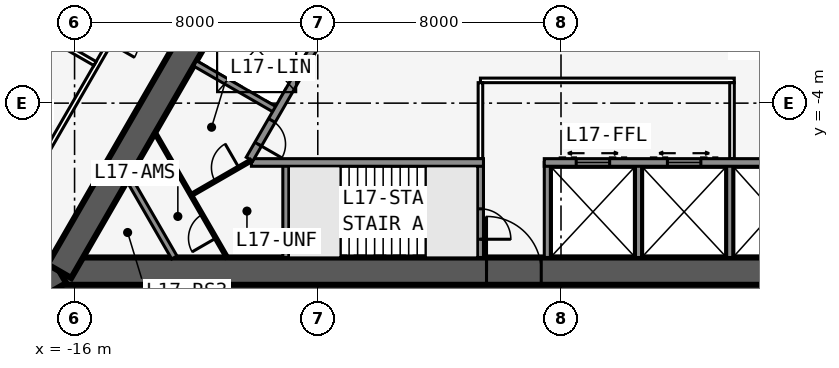
"""IFC4 building model, lengths in metres.
Left out: names, types, materials, properties, quantities, classifications, styles, units other than length and angle.
Written with IfcOpenShell. Run it as: python <this file> out.ifc"""

import sys

from ifc_helpers import new_model, si_unit, direction, frame, frame_2d, origin, place, context, subcontext, project, spatial, rectangle, extrude, element, fill, save


model = new_model("IFC4")
c1 = context("Model", 3, precision=1e-05, world=origin(), true_north=direction((0.0, 1.0)))
c2 = subcontext(c1, "Body", "Model", "MODEL_VIEW")
j1 = project(units=[si_unit("LENGTHUNIT", "METRE"), si_unit("PLANEANGLEUNIT", "RADIAN")], contexts=[c1])
p1 = place(None, origin())
s1 = spatial("IfcSite", under=j1, at=p1, CompositionType="ELEMENT")
p2 = place(p1, origin())
s2 = spatial("IfcBuilding", under=s1, at=p2, CompositionType="ELEMENT")
p3 = place(p2, frame((0.0, 0.0, 69.3)))
s3 = spatial("IfcBuildingStorey", under=s2, at=p3, CompositionType="ELEMENT", Elevation=69.3)
p4 = place(p3, frame((-16.5, -9.526, 0.0), z_axis=(0.0, 0.0, 1.0), x_axis=(1.0, 0.0, 0.0)))
e1 = element("IfcWall", 1, at=p4, inside=s3, PredefinedType="SHEAR", context=c2, shape_type="SweptSolid", body=[
    extrude(rectangle(XDim=33.0, YDim=0.9, at=frame_2d((16.5, 0.0))), origin(), (0.0, 0.0, 1.0), 3.4),
])
p5 = place(p4, frame((14.05, 0.0, 0.0)))
e2 = element("IfcOpeningElement", 2, at=p5, cuts=e1, PredefinedType="OPENING", context=c2, shape_type="SweptSolid", body=[
    extrude(rectangle(XDim=1.8, YDim=2.13, at=frame_2d((0.9, 1.065))), frame((0.0, 0.46, 0.0), z_axis=(0.0, -1.0, 0.0), x_axis=(1.0, 0.0, 0.0)), (0.0, 0.0, 1.0), 0.92),
])
p6 = place(p3, frame((-10.183, -5.951, 0.0), z_axis=(0.0, 0.0, 1.0), x_axis=(1.0, 0.0, 0.0)))
e3 = element("IfcWall", 3, at=p6, inside=s3, PredefinedType="SOLIDWALL", context=c2, shape_type="SweptSolid", body=[
    extrude(rectangle(XDim=7.633, YDim=0.25, at=frame_2d((3.816, 0.0))), origin(), (0.0, 0.0, 1.0), 3.235),
])
p7 = place(p3, frame((-0.55, -5.951, 0.0), z_axis=(0.0, 0.0, 1.0), x_axis=(1.0, 0.0, 0.0)))
e4 = element("IfcWall", 4, at=p7, inside=s3, PredefinedType="SOLIDWALL", context=c2, shape_type="SweptSolid", body=[
    extrude(rectangle(XDim=10.733, YDim=0.25, at=frame_2d((5.366, 0.0))), origin(), (0.0, 0.0, 1.0), 3.235),
])
p8 = place(p7, frame((9.314, 0.0, 0.0)))
e5 = element("IfcOpeningElement", 5, at=p8, cuts=e4, PredefinedType="OPENING", context=c2, shape_type="SweptSolid", body=[
    extrude(rectangle(XDim=0.9, YDim=2.13, at=frame_2d((0.45, 1.065))), frame((0.0, 0.135, 0.0), z_axis=(0.0, -1.0, 0.0), x_axis=(1.0, 0.0, 0.0)), (0.0, 0.0, 1.0), 0.27),
])
p9 = place(p7, frame((1.05, 0.0, 0.0)))
e6 = element("IfcOpeningElement", 6, at=p9, cuts=e4, PredefinedType="OPENING", context=c2, shape_type="SweptSolid", body=[
    extrude(rectangle(XDim=1.1, YDim=2.13, at=frame_2d((0.55, 1.065))), frame((0.0, 0.135, 0.0), z_axis=(0.0, -1.0, 0.0), x_axis=(1.0, 0.0, 0.0)), (0.0, 0.0, 1.0), 0.27),
])
p10 = place(p7, frame((4.05, 0.0, 0.0)))
e7 = element("IfcOpeningElement", 7, at=p10, cuts=e4, PredefinedType="OPENING", context=c2, shape_type="SweptSolid", body=[
    extrude(rectangle(XDim=1.1, YDim=2.13, at=frame_2d((0.55, 1.065))), frame((0.0, 0.135, 0.0), z_axis=(0.0, -1.0, 0.0), x_axis=(1.0, 0.0, 0.0)), (0.0, 0.0, 1.0), 0.27),
])
p11 = place(p3, frame((-9.05, -5.951, 0.0), z_axis=(0.0, 0.0, 1.0), x_axis=(0.0, -1.0, 0.0)))
e8 = element("IfcWall", 8, at=p11, inside=s3, PredefinedType="SOLIDWALL", context=c2, shape_type="SweptSolid", body=[
    extrude(rectangle(XDim=3.125, YDim=0.2, at=frame_2d((1.562, 0.0))), origin(), (0.0, 0.0, 1.0), 3.235),
])
p12 = place(p3, frame((-2.65, -5.951, 0.0), z_axis=(0.0, 0.0, 1.0), x_axis=(0.0, -1.0, 0.0)))
e9 = element("IfcWall", 9, at=p12, inside=s3, PredefinedType="SOLIDWALL", context=c2, shape_type="SweptSolid", body=[
    extrude(rectangle(XDim=3.125, YDim=0.2, at=frame_2d((1.562, 0.0))), origin(), (0.0, 0.0, 1.0), 3.235),
])
p13 = place(p12, frame((1.525, 0.0, 0.0)))
e10 = element("IfcOpeningElement", 10, at=p13, cuts=e9, PredefinedType="OPENING", context=c2, shape_type="SweptSolid", body=[
    extrude(rectangle(XDim=1.0, YDim=2.13, at=frame_2d((0.5, 1.065))), frame((0.0, 0.11, 0.0), z_axis=(0.0, -1.0, 0.0), x_axis=(1.0, 0.0, 0.0)), (0.0, 0.0, 1.0), 0.22),
])
for number, where, z_axis, x_axis in (
    (11, (-0.45, -5.951, 0.0), (0.0, 0.0, 1.0), (0.0, -1.0, 0.0)),
    (12, (2.55, -5.951, 0.0), (0.0, 0.0, 1.0), (0.0, -1.0, 0.0)),
    (13, (5.55, -5.951, 0.0), (0.0, 0.0, 1.0), (0.0, -1.0, 0.0)),
):
    element("IfcWall", number, at=place(p3, frame(where, z_axis=z_axis, x_axis=x_axis)), inside=s3, PredefinedType="SOLIDWALL", context=c2, shape_type="SweptSolid", body=[
        extrude(rectangle(XDim=3.125, YDim=0.2, at=frame_2d((1.562, 0.0))), origin(), (0.0, 0.0, 1.0), 3.235),
    ])
p14 = place(p3, frame((16.5, -9.526, 0.0), z_axis=(0.0, 0.0, 1.0), x_axis=(-0.499999749417, 0.866025548458, 0.0)))
e14 = element("IfcWall", 14, at=p14, inside=s3, PredefinedType="SHEAR", context=c2, shape_type="SweptSolid", body=[
    extrude(rectangle(XDim=33.0, YDim=0.9, at=frame_2d((16.5, 0.0))), origin(), (0.0, 0.0, 1.0), 3.4),
])
p15 = place(p14, frame((14.15, 0.0, 0.0)))
e15 = element("IfcOpeningElement", 15, at=p15, cuts=e14, PredefinedType="OPENING", context=c2, shape_type="SweptSolid", body=[
    extrude(rectangle(XDim=1.8, YDim=2.13, at=frame_2d((0.9, 1.065))), frame((0.0, 0.46, 0.0), z_axis=(0.0, -1.0, 0.0), x_axis=(1.0, 0.0, 0.0)), (0.0, 0.0, 1.0), 0.92),
])
p16 = place(p14, frame((12.6, 0.0, 0.0)))
e16 = element("IfcOpeningElement", 16, at=p16, cuts=e14, PredefinedType="OPENING", context=c2, shape_type="SweptSolid", body=[
    extrude(rectangle(XDim=1.0, YDim=2.13, at=frame_2d((0.5, 1.065))), frame((0.0, 0.46, 0.0), z_axis=(0.0, -1.0, 0.0), x_axis=(1.0, 0.0, 0.0)), (0.0, 0.0, 1.0), 0.92),
])
p17 = place(p3, frame((10.245, -5.843, 0.0), z_axis=(0.0, 0.0, 1.0), x_axis=(-0.499993009313, 0.866029439822, 0.0)))
e17 = element("IfcWall", 17, at=p17, inside=s3, PredefinedType="SOLIDWALL", context=c2, shape_type="SweptSolid", body=[
    extrude(rectangle(XDim=7.733, YDim=0.25, at=frame_2d((3.866, 0.0))), origin(), (0.0, 0.0, 1.0), 3.235),
])
p18 = place(p3, frame((0.0, 19.052, 0.0), z_axis=(0.0, 0.0, 1.0), x_axis=(-0.499999749417, -0.866025548458, 0.0)))
e18 = element("IfcWall", 18, at=p18, inside=s3, PredefinedType="SHEAR", context=c2, shape_type="SweptSolid", body=[
    extrude(rectangle(XDim=33.0, YDim=0.9, at=frame_2d((16.5, 0.0))), origin(), (0.0, 0.0, 1.0), 3.4),
])
p19 = place(p18, frame((14.15, 0.0, 0.0)))
e19 = element("IfcOpeningElement", 19, at=p19, cuts=e18, PredefinedType="OPENING", context=c2, shape_type="SweptSolid", body=[
    extrude(rectangle(XDim=1.8, YDim=2.13, at=frame_2d((0.9, 1.065))), frame((0.0, 0.46, 0.0), z_axis=(0.0, -1.0, 0.0), x_axis=(1.0, 0.0, 0.0)), (0.0, 0.0, 1.0), 0.92),
])
p20 = place(p18, frame((12.6, 0.0, 0.0)))
e20 = element("IfcOpeningElement", 20, at=p20, cuts=e18, PredefinedType="OPENING", context=c2, shape_type="SweptSolid", body=[
    extrude(rectangle(XDim=1.0, YDim=2.13, at=frame_2d((0.5, 1.065))), frame((0.0, 0.46, 0.0), z_axis=(0.0, -1.0, 0.0), x_axis=(1.0, 0.0, 0.0)), (0.0, 0.0, 1.0), 0.92),
])
p21 = place(p3, frame((-4.929, 3.365, 0.0), z_axis=(0.0, 0.0, 1.0), x_axis=(-0.499991433582, -0.866030349552, 0.0)))
e21 = element("IfcWall", 21, at=p21, inside=s3, PredefinedType="SOLIDWALL", context=c2, shape_type="SweptSolid", body=[
    extrude(rectangle(XDim=10.633, YDim=0.25, at=frame_2d((5.316, 0.0))), origin(), (0.0, 0.0, 1.0), 3.235),
])
p22 = place(p21, frame((9.164, 0.0, 0.0)))
e22 = element("IfcOpeningElement", 22, at=p22, cuts=e21, PredefinedType="OPENING", context=c2, shape_type="SweptSolid", body=[
    extrude(rectangle(XDim=0.9, YDim=2.13, at=frame_2d((0.45, 1.065))), frame((0.0, 0.135, 0.0), z_axis=(0.0, -1.0, 0.0), x_axis=(1.0, 0.0, 0.0)), (0.0, 0.0, 1.0), 0.27),
])
p23 = place(p3, frame((-9.329, -4.256, 0.0), z_axis=(0.0, 0.0, 1.0), x_axis=(-0.866022959057, 0.500004234368, 0.0)))
e23 = element("IfcWall", 23, at=p23, inside=s3, PredefinedType="SOLIDWALL", context=c2, shape_type="SweptSolid", body=[
    extrude(rectangle(XDim=3.125, YDim=0.2, at=frame_2d((1.562, 0.0))), origin(), (0.0, 0.0, 1.0), 3.235),
])
p24 = place(p3, frame((-16.5, -9.526, 0.0), z_axis=(0.0, 0.0, 1.0), x_axis=(-0.866031398331, -0.499989616998, 0.0)))
e24 = element("IfcWall", 24, at=p24, inside=s3, PredefinedType="SHEAR", context=c2, shape_type="SweptSolid", body=[
    extrude(rectangle(XDim=4.746, YDim=0.9, at=frame_2d((2.373, 0.0))), origin(), (0.0, 0.0, 1.0), 3.4),
])
p25 = place(p24, frame((1.8, 0.0, 0.0)))
e25 = element("IfcOpeningElement", 25, at=p25, cuts=e24, PredefinedType="OPENING", context=c2, shape_type="SweptSolid", body=[
    extrude(rectangle(XDim=1.8, YDim=2.13, at=frame_2d((0.9, 1.065))), frame((0.0, 0.46, 0.0), z_axis=(0.0, -1.0, 0.0), x_axis=(1.0, 0.0, 0.0)), (0.0, 0.0, 1.0), 0.92),
])
p26 = place(p3, frame((20.027, -10.985, 0.0), z_axis=(0.0, 0.0, 1.0), x_axis=(-0.500001677587, 0.866024435227, 0.0)))
e26 = element("IfcWall", 26, at=p26, inside=s3, PredefinedType="PARTITIONING", context=c2, shape_type="SweptSolid", body=[
    extrude(rectangle(XDim=39.054, YDim=0.15, at=frame_2d((19.527, 0.0))), origin(), (0.0, 0.0, 1.0), 3.235),
])
p27 = place(p26, frame((0.352, 0.0, 0.0)))
e27 = element("IfcOpeningElement", 27, at=p27, cuts=e26, PredefinedType="OPENING", context=c2, shape_type="SweptSolid", body=[
    extrude(rectangle(XDim=0.95, YDim=2.13, at=frame_2d((0.475, 1.065))), frame((0.0, 0.085, 0.0), z_axis=(0.0, -1.0, 0.0), x_axis=(1.0, 0.0, 0.0)), (0.0, 0.0, 1.0), 0.17),
])
p28 = place(p26, frame((6.552, 0.0, 0.0)))
e28 = element("IfcOpeningElement", 28, at=p28, cuts=e26, PredefinedType="OPENING", context=c2, shape_type="SweptSolid", body=[
    extrude(rectangle(XDim=0.95, YDim=2.13, at=frame_2d((0.475, 1.065))), frame((0.0, 0.085, 0.0), z_axis=(0.0, -1.0, 0.0), x_axis=(1.0, 0.0, 0.0)), (0.0, 0.0, 1.0), 0.17),
])
p29 = place(p26, frame((16.552, 0.0, 0.0)))
e29 = element("IfcOpeningElement", 29, at=p29, cuts=e26, PredefinedType="OPENING", context=c2, shape_type="SweptSolid", body=[
    extrude(rectangle(XDim=0.95, YDim=2.13, at=frame_2d((0.475, 1.065))), frame((0.0, 0.085, 0.0), z_axis=(0.0, -1.0, 0.0), x_axis=(1.0, 0.0, 0.0)), (0.0, 0.0, 1.0), 0.17),
])
p30 = place(p26, frame((25.952, 0.0, 0.0)))
e30 = element("IfcOpeningElement", 30, at=p30, cuts=e26, PredefinedType="OPENING", context=c2, shape_type="SweptSolid", body=[
    extrude(rectangle(XDim=0.95, YDim=2.13, at=frame_2d((0.475, 1.065))), frame((0.0, 0.085, 0.0), z_axis=(0.0, -1.0, 0.0), x_axis=(1.0, 0.0, 0.0)), (0.0, 0.0, 1.0), 0.17),
])
p31 = place(p26, frame((36.546, 0.0, 0.0)))
e31 = element("IfcOpeningElement", 31, at=p31, cuts=e26, PredefinedType="OPENING", context=c2, shape_type="SweptSolid", body=[
    extrude(rectangle(XDim=0.95, YDim=2.13, at=frame_2d((0.475, 1.065))), frame((0.0, 0.085, 0.0), z_axis=(0.0, -1.0, 0.0), x_axis=(1.0, 0.0, 0.0)), (0.0, 0.0, 1.0), 0.17),
])
p32 = place(p3, frame((-0.5, 22.836, 0.0), z_axis=(0.0, 0.0, 1.0), x_axis=(-0.500001677587, -0.866024435227, 0.0)))
e32 = element("IfcWall", 32, at=p32, inside=s3, PredefinedType="PARTITIONING", context=c2, shape_type="SweptSolid", body=[
    extrude(rectangle(XDim=39.054, YDim=0.15, at=frame_2d((19.527, 0.0))), origin(), (0.0, 0.0, 1.0), 3.235),
])
p33 = place(p32, frame((1.558, 0.0, 0.0)))
e33 = element("IfcOpeningElement", 33, at=p33, cuts=e32, PredefinedType="OPENING", context=c2, shape_type="SweptSolid", body=[
    extrude(rectangle(XDim=0.95, YDim=2.13, at=frame_2d((0.475, 1.065))), frame((0.0, 0.085, 0.0), z_axis=(0.0, -1.0, 0.0), x_axis=(1.0, 0.0, 0.0)), (0.0, 0.0, 1.0), 0.17),
])
p34 = place(p32, frame((11.552, 0.0, 0.0)))
e34 = element("IfcOpeningElement", 34, at=p34, cuts=e32, PredefinedType="OPENING", context=c2, shape_type="SweptSolid", body=[
    extrude(rectangle(XDim=0.95, YDim=2.13, at=frame_2d((0.475, 1.065))), frame((0.0, 0.085, 0.0), z_axis=(0.0, -1.0, 0.0), x_axis=(1.0, 0.0, 0.0)), (0.0, 0.0, 1.0), 0.17),
])
p35 = place(p32, frame((20.952, 0.0, 0.0)))
e35 = element("IfcOpeningElement", 35, at=p35, cuts=e32, PredefinedType="OPENING", context=c2, shape_type="SweptSolid", body=[
    extrude(rectangle(XDim=0.95, YDim=2.13, at=frame_2d((0.475, 1.065))), frame((0.0, 0.085, 0.0), z_axis=(0.0, -1.0, 0.0), x_axis=(1.0, 0.0, 0.0)), (0.0, 0.0, 1.0), 0.17),
])
p36 = place(p32, frame((27.752, 0.0, 0.0)))
e36 = element("IfcOpeningElement", 36, at=p36, cuts=e32, PredefinedType="OPENING", context=c2, shape_type="SweptSolid", body=[
    extrude(rectangle(XDim=0.95, YDim=2.13, at=frame_2d((0.475, 1.065))), frame((0.0, 0.085, 0.0), z_axis=(0.0, -1.0, 0.0), x_axis=(1.0, 0.0, 0.0)), (0.0, 0.0, 1.0), 0.17),
])
p37 = place(p32, frame((36.546, 0.0, 0.0)))
e37 = element("IfcOpeningElement", 37, at=p37, cuts=e32, PredefinedType="OPENING", context=c2, shape_type="SweptSolid", body=[
    extrude(rectangle(XDim=0.95, YDim=2.13, at=frame_2d((0.475, 1.065))), frame((0.0, 0.085, 0.0), z_axis=(0.0, -1.0, 0.0), x_axis=(1.0, 0.0, 0.0)), (0.0, 0.0, 1.0), 0.17),
])
p38 = place(p3, frame((-15.329, -2.697, 0.0), z_axis=(0.0, 0.0, 1.0), x_axis=(-0.866018409083, 0.500012114982, 0.0)))
e38 = element("IfcWall", 38, at=p38, inside=s3, PredefinedType="PARTITIONING", context=c2, shape_type="SweptSolid", body=[
    extrude(rectangle(XDim=9.485, YDim=0.15, at=frame_2d((4.742, 0.0))), origin(), (0.0, 0.0, 1.0), 2.389),
])
p39 = place(p3, frame((-2.65, -3.251, 0.0), z_axis=(0.0, 0.0, 1.0), x_axis=(1.0, 0.0, 0.0)))
e39 = element("IfcWall", 39, at=p39, inside=s3, PredefinedType="PARTITIONING", context=c2, shape_type="SweptSolid", body=[
    extrude(rectangle(XDim=8.35, YDim=0.15, at=frame_2d((4.175, 0.0))), origin(), (0.0, 0.0, 1.0), 3.235),
])
for number, where, z_axis, x_axis in (
    (40, (-2.65, -5.826, 0.0), (0.0, 0.0, 1.0), (0.0, 1.0, 0.0)),
    (41, (5.625, -5.826, 0.0), (0.0, 0.0, 1.0), (0.0, 1.0, 0.0)),
):
    element("IfcWall", number, at=place(p3, frame(where, z_axis=z_axis, x_axis=x_axis)), inside=s3, PredefinedType="PARTITIONING", context=c2, shape_type="SweptSolid", body=[
        extrude(rectangle(XDim=2.5, YDim=0.15, at=frame_2d((1.25, 0.0))), origin(), (0.0, 0.0, 1.0), 3.235),
    ])
p40 = place(p3, frame((-12.719, -9.076, 0.0), z_axis=(0.0, 0.0, 1.0), x_axis=(-0.499952404951, 0.866052881055, 0.0)))
e42 = element("IfcWall", 42, at=p40, inside=s3, PredefinedType="SOLIDWALL", context=c2, shape_type="SweptSolid", body=[
    extrude(rectangle(XDim=3.002, YDim=0.2, at=frame_2d((1.501, 0.0))), origin(), (0.0, 0.0, 1.0), 3.235),
])
p41 = place(p3, frame((-10.986, -9.076, 0.0), z_axis=(0.0, 0.0, 1.0), x_axis=(-0.499999210213, 0.866025859768, 0.0)))
e43 = element("IfcWall", 43, at=p41, inside=s3, PredefinedType="PARTITIONING", context=c2, shape_type="SweptSolid", body=[
    extrude(rectangle(XDim=4.734, YDim=0.1, at=frame_2d((2.367, 0.0))), origin(), (0.0, 0.0, 1.0), 3.235),
])
p42 = place(p41, frame((0.734, 0.0, 0.0)))
e44 = element("IfcOpeningElement", 44, at=p42, cuts=e43, PredefinedType="OPENING", context=c2, shape_type="SweptSolid", body=[
    extrude(rectangle(XDim=0.9, YDim=2.13, at=frame_2d((0.45, 1.065))), frame((0.0, 0.06, 0.0), z_axis=(0.0, -1.0, 0.0), x_axis=(1.0, 0.0, 0.0)), (0.0, 0.0, 1.0), 0.12),
])
p43 = place(p3, frame((-12.17, -7.026, 0.0), z_axis=(0.0, 0.0, 1.0), x_axis=(0.866015833478, 0.50001657589, 0.0)))
e45 = element("IfcWall", 45, at=p43, inside=s3, PredefinedType="PARTITIONING", context=c2, shape_type="SweptSolid", body=[
    extrude(rectangle(XDim=2.275, YDim=0.1, at=frame_2d((1.138, 0.0))), origin(), (0.0, 0.0, 1.0), 3.235),
])
p44 = place(p43, frame((0.915, 0.0, 0.0)))
e46 = element("IfcOpeningElement", 46, at=p44, cuts=e45, PredefinedType="OPENING", context=c2, shape_type="SweptSolid", body=[
    extrude(rectangle(XDim=0.9, YDim=2.13, at=frame_2d((0.45, 1.065))), frame((0.0, 0.06, 0.0), z_axis=(0.0, -1.0, 0.0), x_axis=(1.0, 0.0, 0.0)), (0.0, 0.0, 1.0), 0.12),
])
p45 = place(p3, frame((-7.247, -7.576, 0.0), z_axis=(0.0, 0.0, 1.0), x_axis=(1.0, 0.0, 0.0)))
e47 = element("IfcWall", 47, at=p45, inside=s3, PredefinedType="SOLIDWALL", context=c2, shape_type="SweptSolid", body=[
    extrude(rectangle(XDim=2.794, YDim=0.1, at=frame_2d((1.397, 0.0))), origin(), (0.0, 0.0, 1.0), 3.4),
])
p46 = place(p5, origin())
e48 = element("IfcDoor", 48, at=p46, inside=s3, OperationType="DOUBLE_DOOR_SINGLE_SWING", PredefinedType="DOOR", context=c2, shape_type="SweptSolid", body=[
    extrude(rectangle(XDim=1.8, YDim=2.13, at=frame_2d((0.9, 1.065))), frame((0.0, 0.025, 0.0), z_axis=(0.0, -1.0, 0.0), x_axis=(1.0, 0.0, 0.0)), (0.0, 0.0, 1.0), 0.05),
])
fill(e2, e48)
p47 = place(p13, origin())
e49 = element("IfcDoor", 49, at=p47, inside=s3, OperationType="SINGLE_SWING_RIGHT", PredefinedType="DOOR", context=c2, shape_type="SweptSolid", body=[
    extrude(rectangle(XDim=1.0, YDim=2.13, at=frame_2d((0.5, 1.065))), frame((0.0, 0.025, 0.0), z_axis=(0.0, -1.0, 0.0), x_axis=(1.0, 0.0, 0.0)), (0.0, 0.0, 1.0), 0.05),
])
fill(e10, e49)
p48 = place(p42, origin())
e50 = element("IfcDoor", 50, at=p48, inside=s3, OperationType="SINGLE_SWING_LEFT", PredefinedType="DOOR", context=c2, shape_type="SweptSolid", body=[
    extrude(rectangle(XDim=0.9, YDim=2.13, at=frame_2d((0.45, 1.065))), frame((0.0, 0.025, 0.0), z_axis=(0.0, -1.0, 0.0), x_axis=(1.0, 0.0, 0.0)), (0.0, 0.0, 1.0), 0.05),
])
fill(e44, e50)
p49 = place(p22, origin())
e51 = element("IfcDoor", 51, at=p49, inside=s3, OperationType="SINGLE_SWING_RIGHT", PredefinedType="DOOR", context=c2, shape_type="SweptSolid", body=[
    extrude(rectangle(XDim=0.9, YDim=2.13, at=frame_2d((0.45, 1.065))), frame((0.0, 0.025, 0.0), z_axis=(0.0, -1.0, 0.0), x_axis=(1.0, 0.0, 0.0)), (0.0, 0.0, 1.0), 0.05),
])
fill(e22, e51)
p50 = place(p44, origin())
e52 = element("IfcDoor", 52, at=p50, inside=s3, OperationType="SINGLE_SWING_RIGHT", PredefinedType="DOOR", context=c2, shape_type="SweptSolid", body=[
    extrude(rectangle(XDim=0.9, YDim=2.13, at=frame_2d((0.45, 1.065))), frame((0.0, 0.025, 0.0), z_axis=(0.0, -1.0, 0.0), x_axis=(1.0, 0.0, 0.0)), (0.0, 0.0, 1.0), 0.05),
])
fill(e46, e52)
p51 = place(p9, origin())
e53 = element("IfcDoor", 53, at=p51, inside=s3, OperationType="DOUBLE_DOOR_SLIDING", PredefinedType="USERDEFINED", context=c2, shape_type="SweptSolid", body=[
    extrude(rectangle(XDim=1.1, YDim=2.13, at=frame_2d((0.55, 1.065))), frame((0.0, 0.025, 0.0), z_axis=(0.0, -1.0, 0.0), x_axis=(1.0, 0.0, 0.0)), (0.0, 0.0, 1.0), 0.05),
])
fill(e6, e53)
p52 = place(p10, origin())
e54 = element("IfcDoor", 54, at=p52, inside=s3, OperationType="DOUBLE_DOOR_SLIDING", PredefinedType="USERDEFINED", context=c2, shape_type="SweptSolid", body=[
    extrude(rectangle(XDim=1.1, YDim=2.13, at=frame_2d((0.55, 1.065))), frame((0.0, 0.025, 0.0), z_axis=(0.0, -1.0, 0.0), x_axis=(1.0, 0.0, 0.0)), (0.0, 0.0, 1.0), 0.05),
])
fill(e7, e54)
save(model, sys.argv[1])
